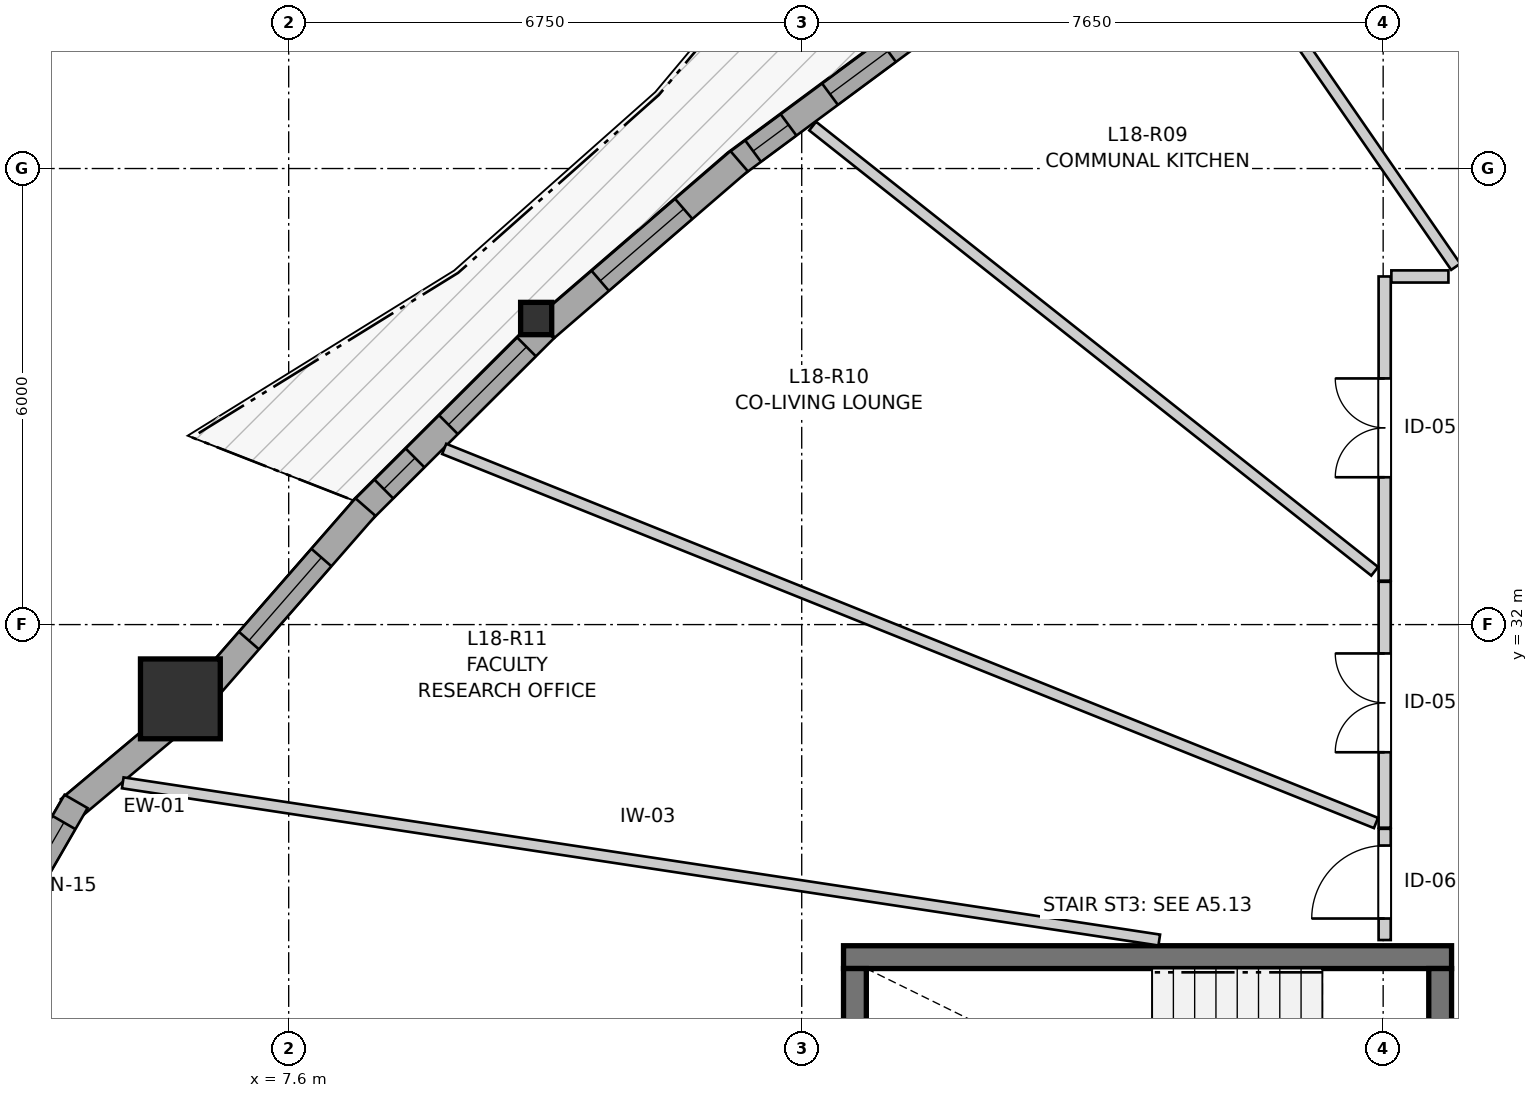
"""IFC4 building model, lengths in metres.
Left out: names, types, materials, properties, quantities, classifications, styles, units other than length and angle.
Written with IfcOpenShell. Run it as: python <this file> out.ifc"""

import sys

from ifc_helpers import new_model, si_unit, direction, frame, frame_2d, origin, origin_2d, place, context, subcontext, project, spatial, rectangle, i_section, extrude, source, transform, mapped, element, fill, save


model = new_model("IFC4")
c1 = context("Model", 3, precision=1e-05, world=origin(), true_north=direction((0.0, 1.0)))
c2 = subcontext(c1, "Body", "Model", "MODEL_VIEW")
j1 = project(units=[si_unit("LENGTHUNIT", "METRE"), si_unit("PLANEANGLEUNIT", "RADIAN")], contexts=[c1])
p1 = place(None, origin())
s1 = spatial("IfcSite", under=j1, at=p1, CompositionType="ELEMENT")
p2 = place(p1, origin())
s2 = spatial("IfcBuilding", under=s1, at=p2, CompositionType="ELEMENT")
p3 = place(p2, frame((0.0, 0.0, 62.2)))
s3 = spatial("IfcBuildingStorey", under=s2, at=p3, CompositionType="ELEMENT", Elevation=62.2)
p4 = place(p3, frame((22.9, 27.625, 0.0), z_axis=(0.0, 0.0, 1.0), x_axis=(-1.0, 0.0, 0.0)))
e1 = element("IfcWall", 1, at=p4, inside=s3, PredefinedType="SHEAR", context=c2, shape_type="SweptSolid", body=[
    extrude(rectangle(XDim=8.0, YDim=0.3, at=frame_2d((4.0, 0.0))), origin(), (0.0, 0.0, 1.0), 2.9),
])
p5 = place(p3, frame((15.05, 27.475, 0.0), z_axis=(0.0, 0.0, 1.0), x_axis=(0.0, -1.0, 0.0)))
e2 = element("IfcWall", 2, at=p5, inside=s3, PredefinedType="SHEAR", context=c2, shape_type="SweptSolid", body=[
    extrude(rectangle(XDim=2.95, YDim=0.3, at=frame_2d((1.475, 0.0))), origin(), (0.0, 0.0, 1.0), 2.9),
])
p6 = place(p3, frame((22.75, 24.525, 0.0), z_axis=(0.0, 0.0, 1.0), x_axis=(0.0, 1.0, 0.0)))
e3 = element("IfcWall", 3, at=p6, inside=s3, PredefinedType="SHEAR", context=c2, shape_type="SweptSolid", body=[
    extrude(rectangle(XDim=2.95, YDim=0.3, at=frame_2d((1.475, 0.0))), origin(), (0.0, 0.0, 1.0), 2.9),
])
p7 = place(p6, frame((0.985, 0.0, 0.0)))
e4 = element("IfcOpeningElement", 4, at=p7, cuts=e3, PredefinedType="OPENING", context=c2, shape_type="SweptSolid", body=[
    extrude(rectangle(XDim=0.98, YDim=2.15, at=frame_2d((0.49, 1.075))), frame((0.0, 0.16, 0.0), z_axis=(0.0, -1.0, 0.0), x_axis=(1.0, 0.0, 0.0)), (0.0, 0.0, 1.0), 0.32),
])
m1 = source(origin(), c2, "Body", "SweptSolid", [
    extrude(rectangle(XDim=1.05, YDim=1.05, at=origin_2d()), origin(), (0.0, 0.0, 1.0), 2.9),
])
p8 = place(p3, frame((6.175, 31.023, 0.0), z_axis=(0.0, 0.0, 1.0), x_axis=(1.0, 0.0, 0.0)))
e5 = element("IfcColumn", 5, at=p8, inside=s3, PredefinedType="COLUMN", context=c2, shape_type="MappedRepresentation", body=[
    mapped(m1, transform((0.0, 0.0, 0.0), x_axis=(1.0, 0.0, 0.0), y_axis=(0.0, 1.0, 0.0), z_axis=(0.0, 0.0, 1.0), scale=1.0)),
])
m2 = source(origin(), c2, "Body", "SweptSolid", [
    extrude(i_section(OverallWidth=0.409, OverallDepth=0.425, WebThickness=0.03, FlangeThickness=0.048, FilletRadius=0.015, at=origin_2d()), origin(), (0.0, 0.0, 1.0), 2.9),
])
p9 = place(p3, frame((10.856, 36.027, 0.0), z_axis=(0.0, 0.0, 1.0), x_axis=(1.0, 0.0, 0.0)))
e6 = element("IfcColumn", 6, at=p9, inside=s3, PredefinedType="PILASTER", context=c2, shape_type="MappedRepresentation", body=[
    mapped(m2, transform((0.0, 0.0, 0.0), x_axis=(1.0, 0.0, 0.0), y_axis=(0.0, 1.0, 0.0), z_axis=(0.0, 0.0, 1.0), scale=1.0)),
])
p10 = place(p3, frame((6.058, 30.696, 0.0), z_axis=(0.0, 0.0, 1.0), x_axis=(-0.766001205563, -0.64283913468, 0.0)))
e7 = element("IfcWall", 7, at=p10, inside=s3, PredefinedType="SOLIDWALL", context=c2, shape_type="SweptSolid", body=[
    extrude(rectangle(XDim=1.752, YDim=0.35, at=frame_2d((0.876, 0.0))), origin(), (0.0, 0.0, 1.0), 2.38),
])
p11 = place(p3, frame((4.802, 29.674, 0.0), z_axis=(0.0, 0.0, 1.0), x_axis=(-0.499995423472, -0.866028046028, 0.0)))
e8 = element("IfcWall", 8, at=p11, inside=s3, PredefinedType="SOLIDWALL", context=c2, shape_type="SweptSolid", body=[
    extrude(rectangle(XDim=2.09, YDim=0.35, at=frame_2d((1.045, 0.0))), origin(), (0.0, 0.0, 1.0), 2.38),
])
p12 = place(p11, frame((0.32, 0.0, 0.82)))
e9 = element("IfcOpeningElement", 9, at=p12, cuts=e8, PredefinedType="OPENING", context=c2, shape_type="SweptSolid", body=[
    extrude(rectangle(XDim=1.45, YDim=1.25, at=frame_2d((0.725, 0.625))), frame((0.0, 0.185, 0.0), z_axis=(0.0, -1.0, 0.0), x_axis=(1.0, 0.0, 0.0)), (0.0, 0.0, 1.0), 0.37),
])
p13 = place(p3, frame((15.898, 39.849, 0.0), z_axis=(0.0, 0.0, 1.0), x_axis=(-0.803775013519, -0.594933380844, 0.0)))
e10 = element("IfcWall", 10, at=p13, inside=s3, PredefinedType="SOLIDWALL", context=c2, shape_type="SweptSolid", body=[
    extrude(rectangle(XDim=3.037, YDim=0.35, at=frame_2d((1.519, 0.0))), origin(), (0.0, 0.0, 1.0), 2.38),
])
p14 = place(p13, frame((0.513, 0.0, 0.82)))
e11 = element("IfcOpeningElement", 11, at=p14, cuts=e10, PredefinedType="OPENING", context=c2, shape_type="SweptSolid", body=[
    extrude(rectangle(XDim=0.95, YDim=1.35, at=frame_2d((0.475, 0.675))), frame((0.0, 0.185, 0.0), z_axis=(0.0, -1.0, 0.0), x_axis=(1.0, 0.0, 0.0)), (0.0, 0.0, 1.0), 0.37),
])
p15 = place(p13, frame((2.142, 0.0, 0.82)))
e12 = element("IfcOpeningElement", 12, at=p15, cuts=e10, PredefinedType="OPENING", context=c2, shape_type="SweptSolid", body=[
    extrude(rectangle(XDim=0.58, YDim=1.35, at=frame_2d((0.29, 0.675))), frame((0.0, 0.185, 0.0), z_axis=(0.0, -1.0, 0.0), x_axis=(1.0, 0.0, 0.0)), (0.0, 0.0, 1.0), 0.37),
])
p16 = place(p3, frame((13.526, 38.097, 0.0), z_axis=(0.0, 0.0, 1.0), x_axis=(-0.757460843483, -0.652880594435, 0.0)))
e13 = element("IfcWall", 13, at=p16, inside=s3, PredefinedType="SOLIDWALL", context=c2, shape_type="SweptSolid", body=[
    extrude(rectangle(XDim=3.355, YDim=0.35, at=frame_2d((1.677, 0.0))), origin(), (0.0, 0.0, 1.0), 2.38),
])
p17 = place(p16, frame((0.962, 0.0, 0.82)))
e14 = element("IfcOpeningElement", 14, at=p17, cuts=e13, PredefinedType="OPENING", context=c2, shape_type="SweptSolid", body=[
    extrude(rectangle(XDim=1.45, YDim=1.25, at=frame_2d((0.725, 0.625))), frame((0.0, 0.185, 0.0), z_axis=(0.0, -1.0, 0.0), x_axis=(1.0, 0.0, 0.0)), (0.0, 0.0, 1.0), 0.37),
])
p18 = place(p3, frame((10.965, 35.889, 0.0), z_axis=(0.0, 0.0, 1.0), x_axis=(-0.708394377581, -0.70581683588, 0.0)))
e15 = element("IfcWall", 15, at=p18, inside=s3, PredefinedType="SOLIDWALL", context=c2, shape_type="SweptSolid", body=[
    extrude(rectangle(XDim=3.41, YDim=0.35, at=frame_2d((1.705, 0.0))), origin(), (0.0, 0.0, 1.0), 2.38),
])
p19 = place(p18, frame((0.333, 0.0, 0.82)))
e16 = element("IfcOpeningElement", 16, at=p19, cuts=e15, PredefinedType="OPENING", context=c2, shape_type="SweptSolid", body=[
    extrude(rectangle(XDim=1.45, YDim=1.25, at=frame_2d((0.725, 0.625))), frame((0.0, 0.185, 0.0), z_axis=(0.0, -1.0, 0.0), x_axis=(1.0, 0.0, 0.0)), (0.0, 0.0, 1.0), 0.37),
])
p20 = place(p18, frame((2.403, 0.0, 0.82)))
e17 = element("IfcOpeningElement", 17, at=p20, cuts=e15, PredefinedType="OPENING", context=c2, shape_type="SweptSolid", body=[
    extrude(rectangle(XDim=0.58, YDim=1.35, at=frame_2d((0.29, 0.675))), frame((0.0, 0.185, 0.0), z_axis=(0.0, -1.0, 0.0), x_axis=(1.0, 0.0, 0.0)), (0.0, 0.0, 1.0), 0.37),
])
p21 = place(p3, frame((8.61, 33.546, 0.0), z_axis=(0.0, 0.0, 1.0), x_axis=(-0.657608204376, -0.753360106149, 0.0)))
e18 = element("IfcWall", 18, at=p21, inside=s3, PredefinedType="SOLIDWALL", context=c2, shape_type="SweptSolid", body=[
    extrude(rectangle(XDim=3.202, YDim=0.35, at=frame_2d((1.601, 0.0))), origin(), (0.0, 0.0, 1.0), 2.38),
])
p22 = place(p21, frame((0.881, 0.0, 0.82)))
e19 = element("IfcOpeningElement", 19, at=p22, cuts=e18, PredefinedType="OPENING", context=c2, shape_type="SweptSolid", body=[
    extrude(rectangle(XDim=1.45, YDim=1.25, at=frame_2d((0.725, 0.625))), frame((0.0, 0.185, 0.0), z_axis=(0.0, -1.0, 0.0), x_axis=(1.0, 0.0, 0.0)), (0.0, 0.0, 1.0), 0.37),
])
p23 = place(p3, frame((22.02, 32.578, 0.0), z_axis=(0.0, 0.0, 1.0), x_axis=(0.0, 1.0, 0.0)))
e20 = element("IfcWall", 20, at=p23, inside=s3, PredefinedType="PARTITIONING", context=c2, shape_type="SweptSolid", body=[
    extrude(rectangle(XDim=4.002, YDim=0.16, at=frame_2d((2.001, 0.0))), origin(), (0.0, 0.0, 1.0), 2.9),
])
p24 = place(p23, frame((1.361, 0.0, 0.0)))
e21 = element("IfcOpeningElement", 21, at=p24, cuts=e20, PredefinedType="OPENING", context=c2, shape_type="SweptSolid", body=[
    extrude(rectangle(XDim=1.3, YDim=2.1, at=frame_2d((0.65, 1.05))), frame((0.0, 0.09, 0.0), z_axis=(0.0, -1.0, 0.0), x_axis=(1.0, 0.0, 0.0)), (0.0, 0.0, 1.0), 0.18),
])
p25 = place(p3, frame((22.02, 29.328, 0.0), z_axis=(0.0, 0.0, 1.0), x_axis=(0.0, 1.0, 0.0)))
e22 = element("IfcWall", 22, at=p25, inside=s3, PredefinedType="PARTITIONING", context=c2, shape_type="SweptSolid", body=[
    extrude(rectangle(XDim=3.235, YDim=0.16, at=frame_2d((1.618, 0.0))), origin(), (0.0, 0.0, 1.0), 2.9),
])
p26 = place(p25, frame((0.992, 0.0, 0.0)))
e23 = element("IfcOpeningElement", 23, at=p26, cuts=e22, PredefinedType="OPENING", context=c2, shape_type="SweptSolid", body=[
    extrude(rectangle(XDim=1.3, YDim=2.1, at=frame_2d((0.65, 1.05))), frame((0.0, 0.09, 0.0), z_axis=(0.0, -1.0, 0.0), x_axis=(1.0, 0.0, 0.0)), (0.0, 0.0, 1.0), 0.18),
])
p27 = place(p3, frame((22.02, 27.85, 0.0), z_axis=(0.0, 0.0, 1.0), x_axis=(0.0, 1.0, 0.0)))
e24 = element("IfcWall", 24, at=p27, inside=s3, PredefinedType="PARTITIONING", context=c2, shape_type="SweptSolid", body=[
    extrude(rectangle(XDim=1.463, YDim=0.16, at=frame_2d((0.731, 0.0))), origin(), (0.0, 0.0, 1.0), 2.9),
])
p28 = place(p27, frame((0.283, 0.0, 0.0)))
e25 = element("IfcOpeningElement", 25, at=p28, cuts=e24, PredefinedType="OPENING", context=c2, shape_type="SweptSolid", body=[
    extrude(rectangle(XDim=0.96, YDim=2.1, at=frame_2d((0.48, 1.05))), frame((0.0, 0.09, 0.0), z_axis=(0.0, -1.0, 0.0), x_axis=(1.0, 0.0, 0.0)), (0.0, 0.0, 1.0), 0.18),
])
p29 = place(p3, frame((5.417, 29.918, 0.0), z_axis=(0.0, 0.0, 1.0), x_axis=(0.98869499802, -0.149940657898, 0.0)))
e26 = element("IfcWall", 26, at=p29, inside=s3, PredefinedType="PARTITIONING", context=c2, shape_type="SweptSolid", body=[
    extrude(rectangle(XDim=13.793, YDim=0.145, at=frame_2d((6.896, 0.0))), origin(), (0.0, 0.0, 1.0), 2.9),
])
p30 = place(p3, frame((9.646, 34.312, 0.0), z_axis=(0.0, 0.0, 1.0), x_axis=(0.928010757454, -0.372553397581, 0.0)))
e27 = element("IfcWall", 27, at=p30, inside=s3, PredefinedType="PARTITIONING", context=c2, shape_type="SweptSolid", body=[
    extrude(rectangle(XDim=13.21, YDim=0.145, at=frame_2d((6.605, 0.0))), origin(), (0.0, 0.0, 1.0), 2.9),
])
p31 = place(p3, frame((14.494, 38.558, 0.0), z_axis=(0.0, 0.0, 1.0), x_axis=(0.783879440631, -0.620913055552, 0.0)))
e28 = element("IfcWall", 28, at=p31, inside=s3, PredefinedType="PARTITIONING", context=c2, shape_type="SweptSolid", body=[
    extrude(rectangle(XDim=9.434, YDim=0.145, at=frame_2d((4.717, 0.0))), origin(), (0.0, 0.0, 1.0), 2.9),
])
p32 = place(p3, frame((19.423, 41.823, 0.0), z_axis=(0.0, 0.0, 1.0), x_axis=(0.568159686118, -0.822918325881, 0.0)))
e29 = element("IfcWall", 29, at=p32, inside=s3, PredefinedType="PARTITIONING", context=c2, shape_type="SweptSolid", body=[
    extrude(rectangle(XDim=6.216, YDim=0.145, at=frame_2d((3.108, 0.0))), origin(), (0.0, 0.0, 1.0), 2.9),
])
p33 = place(p3, frame((22.108, 36.58, 0.0), z_axis=(0.0, 0.0, 1.0), x_axis=(1.0, 0.0, 0.0)))
e30 = element("IfcWall", 30, at=p33, inside=s3, PredefinedType="PARTITIONING", context=c2, shape_type="SweptSolid", body=[
    extrude(rectangle(XDim=0.751, YDim=0.16, at=frame_2d((0.375, 0.0))), origin(), (0.0, 0.0, 1.0), 2.9),
])
m3 = source(origin(), c2, "Body", "SweptSolid", [
    extrude(rectangle(XDim=1.45, YDim=1.25, at=frame_2d((0.725, 0.625))), frame((0.0, 0.03, 0.0), z_axis=(0.0, -1.0, 0.0), x_axis=(1.0, 0.0, 0.0)), (0.0, 0.0, 1.0), 0.06),
])
p34 = place(p12, origin())
e31 = element("IfcWindow", 31, at=p34, inside=s3, PartitioningType="SINGLE_PANEL", PredefinedType="WINDOW", context=c2, shape_type="MappedRepresentation", body=[
    mapped(m3, transform((0.0, 0.0, 0.0), x_axis=(1.0, 0.0, 0.0), y_axis=(0.0, 1.0, 0.0), z_axis=(0.0, 0.0, 1.0), scale=1.0)),
])
fill(e9, e31)
m4 = source(origin(), c2, "Body", "SweptSolid", [
    extrude(rectangle(XDim=0.95, YDim=1.35, at=frame_2d((0.475, 0.675))), frame((0.0, 0.03, 0.0), z_axis=(0.0, -1.0, 0.0), x_axis=(1.0, 0.0, 0.0)), (0.0, 0.0, 1.0), 0.06),
])
p35 = place(p14, origin())
e32 = element("IfcWindow", 32, at=p35, inside=s3, PartitioningType="SINGLE_PANEL", PredefinedType="WINDOW", context=c2, shape_type="MappedRepresentation", body=[
    mapped(m4, transform((0.0, 0.0, 0.0), x_axis=(1.0, 0.0, 0.0), y_axis=(0.0, 1.0, 0.0), z_axis=(0.0, 0.0, 1.0), scale=1.0)),
])
fill(e11, e32)
m5 = source(origin(), c2, "Body", "SweptSolid", [
    extrude(rectangle(XDim=0.58, YDim=1.35, at=frame_2d((0.29, 0.675))), frame((0.0, 0.03, 0.0), z_axis=(0.0, -1.0, 0.0), x_axis=(1.0, 0.0, 0.0)), (0.0, 0.0, 1.0), 0.06),
])
p36 = place(p15, origin())
e33 = element("IfcWindow", 33, at=p36, inside=s3, PartitioningType="SINGLE_PANEL", PredefinedType="WINDOW", context=c2, shape_type="MappedRepresentation", body=[
    mapped(m5, transform((0.0, 0.0, 0.0), x_axis=(1.0, 0.0, 0.0), y_axis=(0.0, 1.0, 0.0), z_axis=(0.0, 0.0, 1.0), scale=1.0)),
])
fill(e12, e33)
p37 = place(p17, origin())
e34 = element("IfcWindow", 34, at=p37, inside=s3, PartitioningType="SINGLE_PANEL", PredefinedType="WINDOW", context=c2, shape_type="MappedRepresentation", body=[
    mapped(m3, transform((0.0, 0.0, 0.0), x_axis=(1.0, 0.0, 0.0), y_axis=(0.0, 1.0, 0.0), z_axis=(0.0, 0.0, 1.0), scale=1.0)),
])
fill(e14, e34)
p38 = place(p19, origin())
e35 = element("IfcWindow", 35, at=p38, inside=s3, PartitioningType="SINGLE_PANEL", PredefinedType="WINDOW", context=c2, shape_type="MappedRepresentation", body=[
    mapped(m3, transform((0.0, 0.0, 0.0), x_axis=(1.0, 0.0, 0.0), y_axis=(0.0, 1.0, 0.0), z_axis=(0.0, 0.0, 1.0), scale=1.0)),
])
fill(e16, e35)
p39 = place(p20, origin())
e36 = element("IfcWindow", 36, at=p39, inside=s3, PartitioningType="SINGLE_PANEL", PredefinedType="WINDOW", context=c2, shape_type="MappedRepresentation", body=[
    mapped(m5, transform((0.0, 0.0, 0.0), x_axis=(1.0, 0.0, 0.0), y_axis=(0.0, 1.0, 0.0), z_axis=(0.0, 0.0, 1.0), scale=1.0)),
])
fill(e17, e36)
p40 = place(p22, origin())
e37 = element("IfcWindow", 37, at=p40, inside=s3, PartitioningType="SINGLE_PANEL", PredefinedType="WINDOW", context=c2, shape_type="MappedRepresentation", body=[
    mapped(m3, transform((0.0, 0.0, 0.0), x_axis=(1.0, 0.0, 0.0), y_axis=(0.0, 1.0, 0.0), z_axis=(0.0, 0.0, 1.0), scale=1.0)),
])
fill(e19, e37)
m6 = source(origin(), c2, "Body", "SweptSolid", [
    extrude(rectangle(XDim=1.3, YDim=2.1, at=frame_2d((0.65, 1.05))), frame((0.0, 0.025, 0.0), z_axis=(0.0, -1.0, 0.0), x_axis=(1.0, 0.0, 0.0)), (0.0, 0.0, 1.0), 0.05),
])
p41 = place(p24, origin())
e38 = element("IfcDoor", 38, at=p41, inside=s3, OperationType="DOUBLE_DOOR_SINGLE_SWING", PredefinedType="DOOR", context=c2, shape_type="MappedRepresentation", body=[
    mapped(m6, transform((0.0, 0.0, 0.0), x_axis=(1.0, 0.0, 0.0), y_axis=(0.0, 1.0, 0.0), z_axis=(0.0, 0.0, 1.0), scale=1.0)),
])
fill(e21, e38)
p42 = place(p26, origin())
e39 = element("IfcDoor", 39, at=p42, inside=s3, OperationType="DOUBLE_DOOR_SINGLE_SWING", PredefinedType="DOOR", context=c2, shape_type="MappedRepresentation", body=[
    mapped(m6, transform((0.0, 0.0, 0.0), x_axis=(1.0, 0.0, 0.0), y_axis=(0.0, 1.0, 0.0), z_axis=(0.0, 0.0, 1.0), scale=1.0)),
])
fill(e23, e39)
m7 = source(origin(), c2, "Body", "SweptSolid", [
    extrude(rectangle(XDim=0.96, YDim=2.1, at=frame_2d((0.48, 1.05))), frame((0.0, 0.025, 0.0), z_axis=(0.0, -1.0, 0.0), x_axis=(1.0, 0.0, 0.0)), (0.0, 0.0, 1.0), 0.05),
])
p43 = place(p28, origin())
e40 = element("IfcDoor", 40, at=p43, inside=s3, OperationType="SINGLE_SWING_LEFT", PredefinedType="DOOR", context=c2, shape_type="MappedRepresentation", body=[
    mapped(m7, transform((0.0, 0.0, 0.0), x_axis=(1.0, 0.0, 0.0), y_axis=(0.0, 1.0, 0.0), z_axis=(0.0, 0.0, 1.0), scale=1.0)),
])
fill(e25, e40)
save(model, sys.argv[1])
